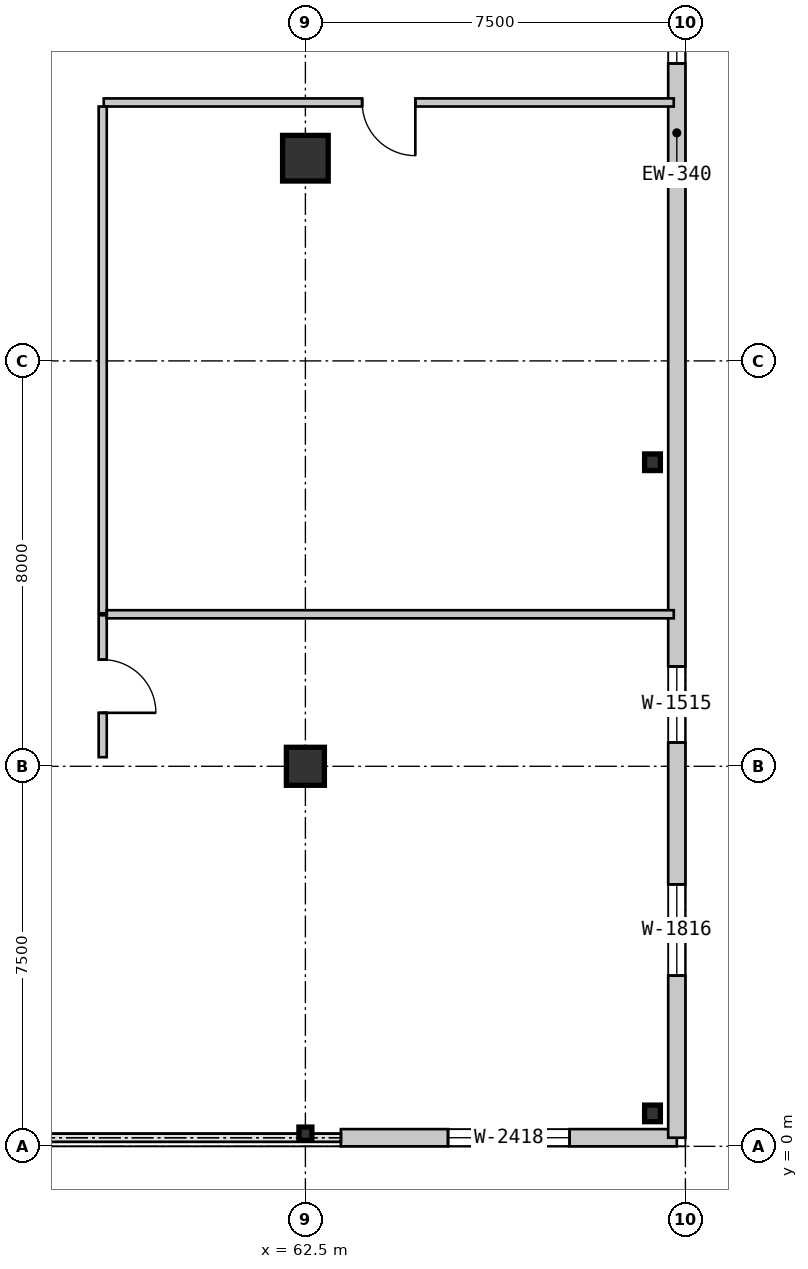
"""IFC4 building model, lengths in metres.
Left out: names, types, materials, properties, quantities, classifications, styles, units other than length and angle.
Written with IfcOpenShell. Run it as: python <this file> out.ifc"""

import sys

from ifc_helpers import new_model, si_unit, direction, frame, frame_2d, origin, origin_2d, place, context, subcontext, project, spatial, rectangle, circle, i_section, extrude, source, transform, mapped, element, fill, save


model = new_model("IFC4")
c1 = context("Model", 3, precision=1e-05, world=origin(), true_north=direction((0.0, 1.0)))
c2 = subcontext(c1, "Body", "Model", "MODEL_VIEW")
j1 = project(units=[si_unit("LENGTHUNIT", "METRE"), si_unit("PLANEANGLEUNIT", "RADIAN")], contexts=[c1])
p1 = place(None, origin())
s1 = spatial("IfcSite", under=j1, at=p1, CompositionType="ELEMENT")
p2 = place(p1, origin())
s2 = spatial("IfcBuilding", under=s1, at=p2, CompositionType="ELEMENT")
p3 = place(p2, frame((0.0, 0.0, 8.4)))
s3 = spatial("IfcBuildingStorey", under=s2, at=p3, CompositionType="ELEMENT", Elevation=8.4)
m1 = source(origin(), c2, "Body", "SweptSolid", [
    extrude(circle(Radius=0.375, at=origin_2d()), origin(), (0.0, 0.0, 1.0), 4.55),
])
p4 = place(p3, frame((62.5, 7.5, 0.0), z_axis=(0.0, 0.0, 1.0), x_axis=(1.0, 0.0, 0.0)))
e1 = element("IfcColumn", 1, at=p4, inside=s3, PredefinedType="COLUMN", context=c2, shape_type="MappedRepresentation", body=[
    mapped(m1, transform((0.0, 0.0, 0.0), scale=1.0)),
])
m2 = source(origin(), c2, "Body", "SweptSolid", [
    extrude(circle(Radius=0.45, at=origin_2d()), origin(), (0.0, 0.0, 1.0), 4.55),
])
p5 = place(p3, frame((62.5, 19.5, 0.0), z_axis=(0.0, 0.0, 1.0), x_axis=(1.0, 0.0, 0.0)))
e2 = element("IfcColumn", 2, at=p5, inside=s3, PredefinedType="COLUMN", context=c2, shape_type="MappedRepresentation", body=[
    mapped(m2, transform((0.0, 0.0, 0.0), scale=1.0)),
])
m3 = source(origin(), c2, "Body", "SweptSolid", [
    extrude(i_section(OverallWidth=0.311, OverallDepth=0.327, WebThickness=0.016, FlangeThickness=0.025, at=origin_2d()), origin(), (0.0, 0.0, 1.0), 4.55),
])
for number, where, z_axis, x_axis in (
    (3, (69.35, 0.65, 0.0), (0.0, 0.0, 1.0), (1.0, 0.0, 0.0)),
    (4, (69.35, 13.5, 0.0), (0.0, 0.0, 1.0), (1.0, 0.0, 0.0)),
):
    element("IfcColumn", number, at=place(p3, frame(where, z_axis=z_axis, x_axis=x_axis)), inside=s3, PredefinedType="COLUMN", context=c2, shape_type="MappedRepresentation", body=[
        mapped(m3, transform((0.0, 0.0, 0.0), scale=1.0)),
    ])
m4 = source(origin(), c2, "Body", "SweptSolid", [
    extrude(i_section(OverallWidth=0.256, OverallDepth=0.26, WebThickness=0.01, FlangeThickness=0.017, at=origin_2d()), origin(), (0.0, 0.0, 1.0), 4.55),
])
p6 = place(p3, frame((62.5, 0.25, 0.0), z_axis=(0.0, 0.0, 1.0), x_axis=(1.0, 0.0, 0.0)))
e5 = element("IfcColumn", 5, at=p6, inside=s3, PredefinedType="PILASTER", context=c2, shape_type="MappedRepresentation", body=[
    mapped(m4, transform((0.0, 0.0, 0.0), scale=1.0)),
])
m5 = source(origin(), c2, "Body", "SweptSolid", [
    extrude(rectangle(XDim=6.63, YDim=0.34, at=frame_2d((3.315, 0.0))), origin(), (0.0, 0.0, 1.0), 4.29),
])
p7 = place(p3, frame((63.2, 0.17, 0.0), z_axis=(0.0, 0.0, 1.0), x_axis=(1.0, 0.0, 0.0)))
e6 = element("IfcWall", 6, at=p7, inside=s3, PredefinedType="SOLIDWALL", context=c2, shape_type="MappedRepresentation", body=[
    mapped(m5, transform((0.0, 0.0, 0.0), scale=1.0)),
])
m6 = source(origin(), c2, "Body", "SweptSolid", [
    extrude(rectangle(XDim=2.4, YDim=1.8, at=frame_2d((1.2, 0.9))), frame((0.0, 0.18, 0.0), z_axis=(0.0, -1.0, 0.0), x_axis=(1.0, 0.0, 0.0)), (0.0, 0.0, 1.0), 0.36),
])
p8 = place(p7, frame((2.115, 0.0, 0.9)))
e7 = element("IfcOpeningElement", 7, at=p8, cuts=e6, PredefinedType="OPENING", context=c2, shape_type="MappedRepresentation", body=[
    mapped(m6, transform((0.0, 0.0, 0.0), scale=1.0)),
])
m7 = source(origin(), c2, "Body", "SweptSolid", [
    extrude(rectangle(XDim=39.66, YDim=0.34, at=frame_2d((19.83, 0.0))), origin(), (0.0, 0.0, 1.0), 4.29),
])
p9 = place(p3, frame((69.83, 0.17, 0.0), z_axis=(0.0, 0.0, 1.0), x_axis=(0.0, 1.0, 0.0)))
e8 = element("IfcWall", 8, at=p9, inside=s3, PredefinedType="SOLIDWALL", context=c2, shape_type="MappedRepresentation", body=[
    mapped(m7, transform((0.0, 0.0, 0.0), scale=1.0)),
])
m8 = source(origin(), c2, "Body", "SweptSolid", [
    extrude(rectangle(XDim=1.8, YDim=1.6, at=frame_2d((0.9, 0.8))), frame((0.0, 0.18, 0.0), z_axis=(0.0, -1.0, 0.0), x_axis=(1.0, 0.0, 0.0)), (0.0, 0.0, 1.0), 0.36),
])
p10 = place(p9, frame((3.2, 0.0, 0.95)))
e9 = element("IfcOpeningElement", 9, at=p10, cuts=e8, PredefinedType="OPENING", context=c2, shape_type="MappedRepresentation", body=[
    mapped(m8, transform((0.0, 0.0, 0.0), scale=1.0)),
])
m9 = source(origin(), c2, "Body", "SweptSolid", [
    extrude(rectangle(XDim=1.5, YDim=1.5, at=frame_2d((0.75, 0.75))), frame((0.0, 0.18, 0.0), z_axis=(0.0, -1.0, 0.0), x_axis=(1.0, 0.0, 0.0)), (0.0, 0.0, 1.0), 0.36),
])
p11 = place(p9, frame((7.8, 0.0, 0.95)))
e10 = element("IfcOpeningElement", 10, at=p11, cuts=e8, PredefinedType="OPENING", context=c2, shape_type="MappedRepresentation", body=[
    mapped(m9, transform((0.0, 0.0, 0.0), scale=1.0)),
])
m10 = source(origin(), c2, "Body", "SweptSolid", [
    extrude(rectangle(XDim=1.2, YDim=1.5, at=frame_2d((0.6, 0.75))), frame((0.0, 0.18, 0.0), z_axis=(0.0, -1.0, 0.0), x_axis=(1.0, 0.0, 0.0)), (0.0, 0.0, 1.0), 0.36),
])
p12 = place(p9, frame((21.2, 0.0, 0.95)))
e11 = element("IfcOpeningElement", 11, at=p12, cuts=e8, PredefinedType="OPENING", context=c2, shape_type="MappedRepresentation", body=[
    mapped(m10, transform((0.0, 0.0, 0.0), scale=1.0)),
])
p13 = place(p9, frame((36.0, 0.0, 0.95)))
e12 = element("IfcOpeningElement", 12, at=p13, cuts=e8, PredefinedType="OPENING", context=c2, shape_type="MappedRepresentation", body=[
    mapped(m6, transform((0.0, 0.0, 0.0), scale=1.0)),
])
m11 = source(origin(), c2, "Body", "SweptSolid", [
    extrude(rectangle(XDim=2.8, YDim=0.16, at=frame_2d((1.4, 0.0))), origin(), (0.0, 0.0, 1.0), 4.29),
])
p14 = place(p3, frame((58.5, 10.48, 0.0), z_axis=(0.0, 0.0, 1.0), x_axis=(0.0, -1.0, 0.0)))
e13 = element("IfcWall", 13, at=p14, inside=s3, PredefinedType="PARTITIONING", context=c2, shape_type="MappedRepresentation", body=[
    mapped(m11, transform((0.0, 0.0, 0.0), scale=1.0)),
])
m12 = source(origin(), c2, "Body", "SweptSolid", [
    extrude(rectangle(XDim=1.05, YDim=2.1, at=frame_2d((0.525, 1.05))), frame((0.0, 0.09, 0.0), z_axis=(0.0, -1.0, 0.0), x_axis=(1.0, 0.0, 0.0)), (0.0, 0.0, 1.0), 0.18),
])
p15 = place(p14, frame((0.875, 0.0, 0.0)))
e14 = element("IfcOpeningElement", 14, at=p15, cuts=e13, PredefinedType="OPENING", context=c2, shape_type="MappedRepresentation", body=[
    mapped(m12, transform((0.0, 0.0, 0.0), scale=1.0)),
])
m13 = source(origin(), c2, "Body", "SweptSolid", [
    extrude(rectangle(XDim=11.25, YDim=0.16, at=frame_2d((5.625, 0.0))), origin(), (0.0, 0.0, 1.0), 4.29),
])
p16 = place(p3, frame((69.77, 20.6, 0.0), z_axis=(0.0, 0.0, 1.0), x_axis=(-1.0, 0.0, 0.0)))
e15 = element("IfcWall", 15, at=p16, inside=s3, PredefinedType="PARTITIONING", context=c2, shape_type="MappedRepresentation", body=[
    mapped(m13, transform((0.0, 0.0, 0.0), scale=1.0)),
])
p17 = place(p16, frame((5.1, 0.0, 0.0)))
e16 = element("IfcOpeningElement", 16, at=p17, cuts=e15, PredefinedType="OPENING", context=c2, shape_type="MappedRepresentation", body=[
    mapped(m12, transform((0.0, 0.0, 0.0), scale=1.0)),
])
m14 = source(origin(), c2, "Body", "SweptSolid", [
    extrude(rectangle(XDim=10.0, YDim=0.16, at=frame_2d((5.0, 0.0))), origin(), (0.0, 0.0, 1.0), 4.29),
])
p18 = place(p3, frame((58.5, 20.52, 0.0), z_axis=(0.0, 0.0, 1.0), x_axis=(0.0, -1.0, 0.0)))
e17 = element("IfcWall", 17, at=p18, inside=s3, PredefinedType="PARTITIONING", context=c2, shape_type="MappedRepresentation", body=[
    mapped(m14, transform((0.0, 0.0, 0.0), scale=1.0)),
])
m15 = source(origin(), c2, "Body", "SweptSolid", [
    extrude(rectangle(XDim=11.19, YDim=0.16, at=frame_2d((5.595, 0.0))), origin(), (0.0, 0.0, 1.0), 4.29),
])
p19 = place(p3, frame((58.58, 10.5, 0.0), z_axis=(0.0, 0.0, 1.0), x_axis=(1.0, 0.0, 0.0)))
e18 = element("IfcWall", 18, at=p19, inside=s3, PredefinedType="PARTITIONING", context=c2, shape_type="MappedRepresentation", body=[
    mapped(m15, transform((0.0, 0.0, 0.0), scale=1.0)),
])
m16 = source(origin(), c2, "Body", "SweptSolid", [
    extrude(rectangle(XDim=2.4, YDim=1.8, at=frame_2d((1.2, 0.9))), frame((0.0, 0.03, 0.0), z_axis=(0.0, -1.0, 0.0), x_axis=(1.0, 0.0, 0.0)), (0.0, 0.0, 1.0), 0.06),
])
p20 = place(p8, origin())
e19 = element("IfcWindow", 19, at=p20, inside=s3, PartitioningType="SINGLE_PANEL", PredefinedType="WINDOW", context=c2, shape_type="MappedRepresentation", body=[
    mapped(m16, transform((0.0, 0.0, 0.0), scale=1.0)),
])
fill(e7, e19)
m17 = source(origin(), c2, "Body", "SweptSolid", [
    extrude(rectangle(XDim=1.8, YDim=1.6, at=frame_2d((0.9, 0.8))), frame((0.0, 0.03, 0.0), z_axis=(0.0, -1.0, 0.0), x_axis=(1.0, 0.0, 0.0)), (0.0, 0.0, 1.0), 0.06),
])
p21 = place(p10, origin())
e20 = element("IfcWindow", 20, at=p21, inside=s3, PartitioningType="SINGLE_PANEL", PredefinedType="WINDOW", context=c2, shape_type="MappedRepresentation", body=[
    mapped(m17, transform((0.0, 0.0, 0.0), scale=1.0)),
])
fill(e9, e20)
m18 = source(origin(), c2, "Body", "SweptSolid", [
    extrude(rectangle(XDim=1.5, YDim=1.5, at=frame_2d((0.75, 0.75))), frame((0.0, 0.03, 0.0), z_axis=(0.0, -1.0, 0.0), x_axis=(1.0, 0.0, 0.0)), (0.0, 0.0, 1.0), 0.06),
])
p22 = place(p11, origin())
e21 = element("IfcWindow", 21, at=p22, inside=s3, PartitioningType="SINGLE_PANEL", PredefinedType="WINDOW", context=c2, shape_type="MappedRepresentation", body=[
    mapped(m18, transform((0.0, 0.0, 0.0), scale=1.0)),
])
fill(e10, e21)
m19 = source(origin(), c2, "Body", "SweptSolid", [
    extrude(rectangle(XDim=1.2, YDim=1.5, at=frame_2d((0.6, 0.75))), frame((0.0, 0.03, 0.0), z_axis=(0.0, -1.0, 0.0), x_axis=(1.0, 0.0, 0.0)), (0.0, 0.0, 1.0), 0.06),
])
p23 = place(p12, origin())
e22 = element("IfcWindow", 22, at=p23, inside=s3, PartitioningType="SINGLE_PANEL", PredefinedType="WINDOW", context=c2, shape_type="MappedRepresentation", body=[
    mapped(m19, transform((0.0, 0.0, 0.0), scale=1.0)),
])
fill(e11, e22)
m20 = source(origin(), c2, "Body", "SweptSolid", [
    extrude(rectangle(XDim=1.05, YDim=2.1, at=frame_2d((0.525, 1.05))), frame((0.0, 0.025, 0.0), z_axis=(0.0, -1.0, 0.0), x_axis=(1.0, 0.0, 0.0)), (0.0, 0.0, 1.0), 0.05),
])
p24 = place(p15, origin())
e23 = element("IfcDoor", 23, at=p24, inside=s3, OperationType="SINGLE_SWING_RIGHT", PredefinedType="DOOR", context=c2, shape_type="MappedRepresentation", body=[
    mapped(m20, transform((0.0, 0.0, 0.0), scale=1.0)),
])
fill(e14, e23)
p25 = place(p17, origin())
e24 = element("IfcDoor", 24, at=p25, inside=s3, OperationType="SINGLE_SWING_LEFT", PredefinedType="DOOR", context=c2, shape_type="MappedRepresentation", body=[
    mapped(m20, transform((0.0, 0.0, 0.0), scale=1.0)),
])
fill(e16, e24)
save(model, sys.argv[1])
